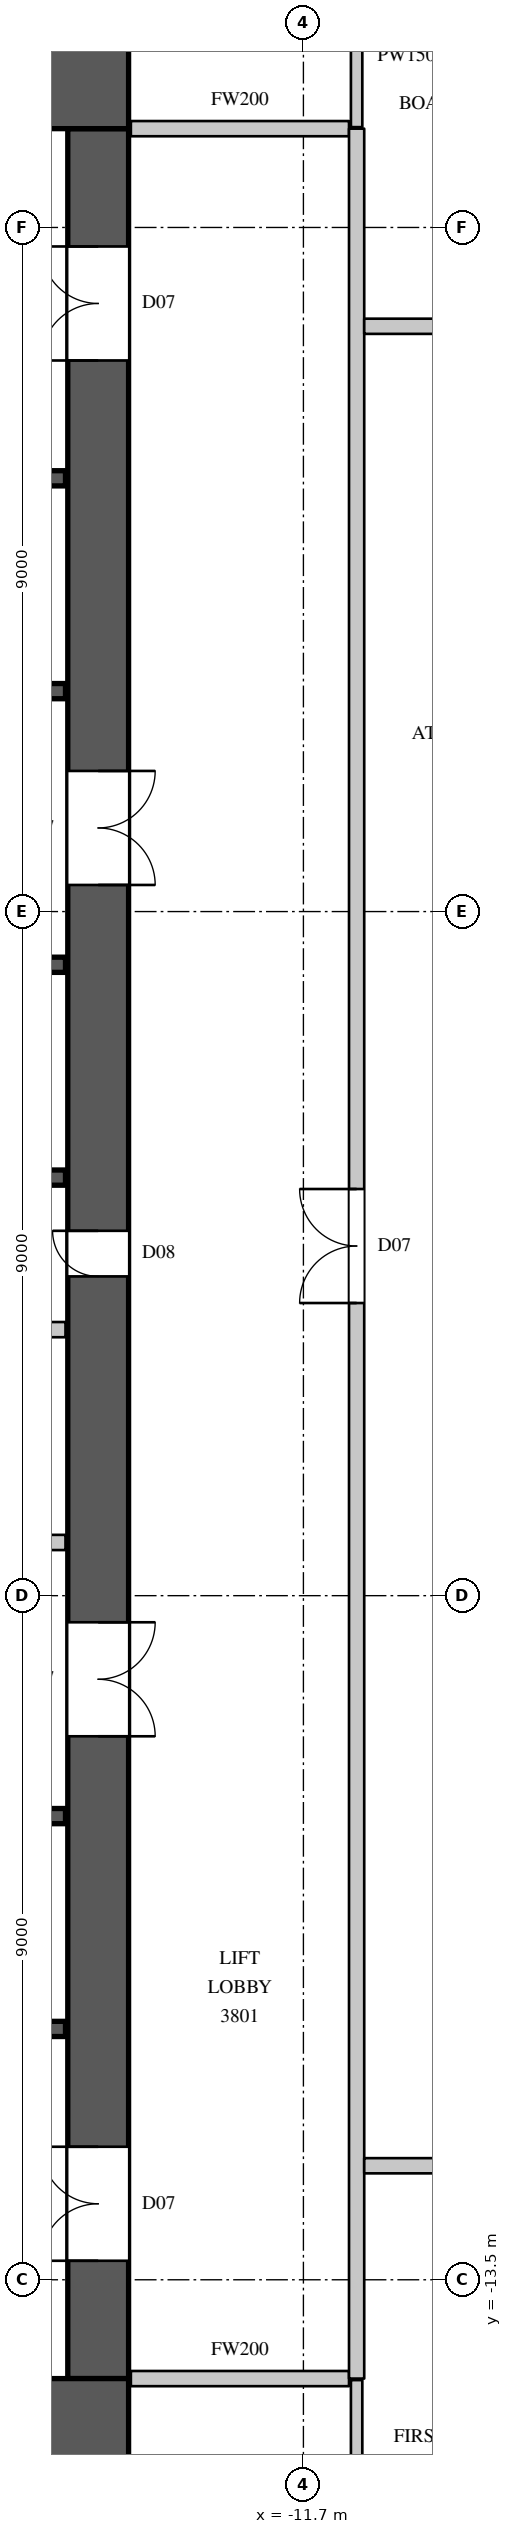
"""IFC4 building model, lengths in metres.
Left out: names, types, materials, properties, quantities, classifications, styles, units other than length and angle.
Written with IfcOpenShell. Run it as: python <this file> out.ifc"""

import sys

from ifc_helpers import new_model, si_unit, direction, frame, frame_2d, origin, place, context, subcontext, project, spatial, rectangle, extrude, element, fill, save


model = new_model("IFC4")
c1 = context("Model", 3, precision=1e-05, world=origin(), true_north=direction((0.0, 1.0)))
c2 = subcontext(c1, "Body", "Model", "MODEL_VIEW")
j1 = project(units=[si_unit("LENGTHUNIT", "METRE"), si_unit("PLANEANGLEUNIT", "RADIAN")], contexts=[c1])
p1 = place(None, origin())
s1 = spatial("IfcSite", under=j1, at=p1, CompositionType="ELEMENT")
p2 = place(p1, origin())
s2 = spatial("IfcBuilding", under=s1, at=p2, CompositionType="ELEMENT")
p3 = place(p2, frame((0.0, 0.0, 176.9)))
s3 = spatial("IfcBuildingStorey", under=s2, at=p3, CompositionType="ELEMENT", Elevation=176.9)
for number, where, z_axis, x_axis in (
    (1, (-30.0, 15.4, 0.0), (0.0, 0.0, 1.0), (1.0, 0.0, 0.0)),
    (2, (-30.0, -15.4, 0.0), (0.0, 0.0, 1.0), (1.0, 0.0, 0.0)),
):
    element("IfcWall", number, at=place(p3, frame(where, z_axis=z_axis, x_axis=x_axis)), inside=s3, PredefinedType="SHEAR", context=c2, shape_type="SweptSolid", body=[
        extrude(rectangle(XDim=16.0, YDim=1.2, at=frame_2d((8.0, 0.0))), origin(), (0.0, 0.0, 1.0), 4.1),
    ])
p4 = place(p3, frame((-14.4, -14.8, 0.0), z_axis=(0.0, 0.0, 1.0), x_axis=(0.0, 1.0, 0.0)))
e3 = element("IfcWall", 3, at=p4, inside=s3, PredefinedType="SHEAR", context=c2, shape_type="SweptSolid", body=[
    extrude(rectangle(XDim=29.6, YDim=0.8, at=frame_2d((14.8, 0.0))), origin(), (0.0, 0.0, 1.0), 4.1),
])
p5 = place(p4, frame((1.55, 0.0, 0.0)))
e4 = element("IfcOpeningElement", 4, at=p5, cuts=e3, PredefinedType="OPENING", context=c2, shape_type="SweptSolid", body=[
    extrude(rectangle(XDim=1.5, YDim=2.4, at=frame_2d((0.75, 1.2))), frame((0.0, 0.41, 0.0), z_axis=(0.0, -1.0, 0.0), x_axis=(1.0, 0.0, 0.0)), (0.0, 0.0, 1.0), 0.82),
])
p6 = place(p4, frame((26.55, 0.0, 0.0)))
e5 = element("IfcOpeningElement", 5, at=p6, cuts=e3, PredefinedType="OPENING", context=c2, shape_type="SweptSolid", body=[
    extrude(rectangle(XDim=1.5, YDim=2.4, at=frame_2d((0.75, 1.2))), frame((0.0, 0.41, 0.0), z_axis=(0.0, -1.0, 0.0), x_axis=(1.0, 0.0, 0.0)), (0.0, 0.0, 1.0), 0.82),
])
p7 = place(p4, frame((8.45, 0.0, 0.0)))
e6 = element("IfcOpeningElement", 6, at=p7, cuts=e3, PredefinedType="OPENING", context=c2, shape_type="SweptSolid", body=[
    extrude(rectangle(XDim=1.5, YDim=2.4, at=frame_2d((0.75, 1.2))), frame((0.0, 0.41, 0.0), z_axis=(0.0, -1.0, 0.0), x_axis=(1.0, 0.0, 0.0)), (0.0, 0.0, 1.0), 0.82),
])
p8 = place(p4, frame((19.65, 0.0, 0.0)))
e7 = element("IfcOpeningElement", 7, at=p8, cuts=e3, PredefinedType="OPENING", context=c2, shape_type="SweptSolid", body=[
    extrude(rectangle(XDim=1.5, YDim=2.4, at=frame_2d((0.75, 1.2))), frame((0.0, 0.41, 0.0), z_axis=(0.0, -1.0, 0.0), x_axis=(1.0, 0.0, 0.0)), (0.0, 0.0, 1.0), 0.82),
])
p9 = place(p4, frame((14.5, 0.0, 0.0)))
e8 = element("IfcOpeningElement", 8, at=p9, cuts=e3, PredefinedType="OPENING", context=c2, shape_type="SweptSolid", body=[
    extrude(rectangle(XDim=0.6, YDim=2.0, at=frame_2d((0.3, 1.0))), frame((0.0, 0.41, 0.0), z_axis=(0.0, -1.0, 0.0), x_axis=(1.0, 0.0, 0.0)), (0.0, 0.0, 1.0), 0.82),
])
p10 = place(p3, frame((-29.17, -3.8, 0.0), z_axis=(0.0, 0.0, 1.0), x_axis=(1.0, 0.0, 0.0)))
e9 = element("IfcWall", 9, at=p10, inside=s3, PredefinedType="PARTITIONING", context=c2, shape_type="SweptSolid", body=[
    extrude(rectangle(XDim=14.34, YDim=0.2, at=frame_2d((7.17, 0.0))), origin(), (0.0, 0.0, 1.0), 3.8),
])
p11 = place(p10, frame((6.7, 0.0, 0.0)))
e10 = element("IfcOpeningElement", 10, at=p11, cuts=e9, PredefinedType="OPENING", context=c2, shape_type="SweptSolid", body=[
    extrude(rectangle(XDim=0.9, YDim=2.2, at=frame_2d((0.45, 1.1))), frame((0.0, 0.11, 0.0), z_axis=(0.0, -1.0, 0.0), x_axis=(1.0, 0.0, 0.0)), (0.0, 0.0, 1.0), 0.22),
])
for number, where, z_axis, x_axis in (
    (11, (-13.97, -14.8, 0.0), (0.0, 0.0, 1.0), (1.0, 0.0, 0.0)),
    (12, (-13.97, 14.8, 0.0), (0.0, 0.0, 1.0), (1.0, 0.0, 0.0)),
):
    element("IfcWall", number, at=place(p3, frame(where, z_axis=z_axis, x_axis=x_axis)), inside=s3, PredefinedType="PARTITIONING", context=c2, shape_type="SweptSolid", body=[
        extrude(rectangle(XDim=2.87, YDim=0.2, at=frame_2d((1.435, 0.0))), origin(), (0.0, 0.0, 1.0), 3.8),
    ])
p12 = place(p3, frame((-11.0, -14.8, 0.0), z_axis=(0.0, 0.0, 1.0), x_axis=(0.0, 1.0, 0.0)))
e13 = element("IfcWall", 13, at=p12, inside=s3, PredefinedType="PARTITIONING", context=c2, shape_type="SweptSolid", body=[
    extrude(rectangle(XDim=29.6, YDim=0.2, at=frame_2d((14.8, 0.0))), origin(), (0.0, 0.0, 1.0), 3.8),
])
p13 = place(p12, frame((14.15, 0.0, 0.0)))
e14 = element("IfcOpeningElement", 14, at=p13, cuts=e13, PredefinedType="OPENING", context=c2, shape_type="SweptSolid", body=[
    extrude(rectangle(XDim=1.5, YDim=2.4, at=frame_2d((0.75, 1.2))), frame((0.0, 0.11, 0.0), z_axis=(0.0, -1.0, 0.0), x_axis=(1.0, 0.0, 0.0)), (0.0, 0.0, 1.0), 0.22),
])
p14 = place(p3, frame((-10.9, -12.0, 0.0), z_axis=(0.0, 0.0, 1.0), x_axis=(1.0, 0.0, 0.0)))
e15 = element("IfcWall", 15, at=p14, inside=s3, PredefinedType="PARTITIONING", context=c2, shape_type="SweptSolid", body=[
    extrude(rectangle(XDim=21.8, YDim=0.2, at=frame_2d((10.9, 0.0))), origin(), (0.0, 0.0, 1.0), 3.8),
])
p15 = place(p14, frame((0.95, 0.0, 0.0)))
e16 = element("IfcOpeningElement", 16, at=p15, cuts=e15, PredefinedType="OPENING", context=c2, shape_type="SweptSolid", body=[
    extrude(rectangle(XDim=0.9, YDim=2.2, at=frame_2d((0.45, 1.1))), frame((0.0, 0.11, 0.0), z_axis=(0.0, -1.0, 0.0), x_axis=(1.0, 0.0, 0.0)), (0.0, 0.0, 1.0), 0.22),
])
p16 = place(p14, frame((3.95, 0.0, 0.0)))
e17 = element("IfcOpeningElement", 17, at=p16, cuts=e15, PredefinedType="OPENING", context=c2, shape_type="SweptSolid", body=[
    extrude(rectangle(XDim=0.9, YDim=2.2, at=frame_2d((0.45, 1.1))), frame((0.0, 0.11, 0.0), z_axis=(0.0, -1.0, 0.0), x_axis=(1.0, 0.0, 0.0)), (0.0, 0.0, 1.0), 0.22),
])
p17 = place(p14, frame((6.7, 0.0, 0.0)))
e18 = element("IfcOpeningElement", 18, at=p17, cuts=e15, PredefinedType="OPENING", context=c2, shape_type="SweptSolid", body=[
    extrude(rectangle(XDim=0.9, YDim=2.2, at=frame_2d((0.45, 1.1))), frame((0.0, 0.11, 0.0), z_axis=(0.0, -1.0, 0.0), x_axis=(1.0, 0.0, 0.0)), (0.0, 0.0, 1.0), 0.22),
])
p18 = place(p14, frame((10.0, 0.0, 0.0)))
e19 = element("IfcOpeningElement", 19, at=p18, cuts=e15, PredefinedType="OPENING", context=c2, shape_type="SweptSolid", body=[
    extrude(rectangle(XDim=0.9, YDim=2.2, at=frame_2d((0.45, 1.1))), frame((0.0, 0.11, 0.0), z_axis=(0.0, -1.0, 0.0), x_axis=(1.0, 0.0, 0.0)), (0.0, 0.0, 1.0), 0.22),
])
p19 = place(p14, frame((13.55, 0.0, 0.0)))
e20 = element("IfcOpeningElement", 20, at=p19, cuts=e15, PredefinedType="OPENING", context=c2, shape_type="SweptSolid", body=[
    extrude(rectangle(XDim=0.9, YDim=2.2, at=frame_2d((0.45, 1.1))), frame((0.0, 0.11, 0.0), z_axis=(0.0, -1.0, 0.0), x_axis=(1.0, 0.0, 0.0)), (0.0, 0.0, 1.0), 0.22),
])
p20 = place(p14, frame((15.8, 0.0, 0.0)))
e21 = element("IfcOpeningElement", 21, at=p20, cuts=e15, PredefinedType="OPENING", context=c2, shape_type="SweptSolid", body=[
    extrude(rectangle(XDim=1.1, YDim=2.4, at=frame_2d((0.55, 1.2))), frame((0.0, 0.11, 0.0), z_axis=(0.0, -1.0, 0.0), x_axis=(1.0, 0.0, 0.0)), (0.0, 0.0, 1.0), 0.22),
])
p21 = place(p14, frame((18.0, 0.0, 0.0)))
e22 = element("IfcOpeningElement", 22, at=p21, cuts=e15, PredefinedType="OPENING", context=c2, shape_type="SweptSolid", body=[
    extrude(rectangle(XDim=1.1, YDim=2.4, at=frame_2d((0.55, 1.2))), frame((0.0, 0.11, 0.0), z_axis=(0.0, -1.0, 0.0), x_axis=(1.0, 0.0, 0.0)), (0.0, 0.0, 1.0), 0.22),
])
p22 = place(p3, frame((-10.9, 12.2, 0.0), z_axis=(0.0, 0.0, 1.0), x_axis=(1.0, 0.0, 0.0)))
e23 = element("IfcWall", 23, at=p22, inside=s3, PredefinedType="PARTITIONING", context=c2, shape_type="SweptSolid", body=[
    extrude(rectangle(XDim=3.704, YDim=0.2, at=frame_2d((1.852, 0.0))), origin(), (0.0, 0.0, 1.0), 3.8),
])
p23 = place(p22, frame((1.7, 0.0, 0.0)))
e24 = element("IfcOpeningElement", 24, at=p23, cuts=e23, PredefinedType="OPENING", context=c2, shape_type="SweptSolid", body=[
    extrude(rectangle(XDim=1.1, YDim=2.4, at=frame_2d((0.55, 1.2))), frame((0.0, 0.11, 0.0), z_axis=(0.0, -1.0, 0.0), x_axis=(1.0, 0.0, 0.0)), (0.0, 0.0, 1.0), 0.22),
])
for number, where, z_axis, x_axis in (
    (25, (-11.0, -16.7, 0.0), (0.0, 0.0, 1.0), (0.0, 1.0, 0.0)),
    (26, (-11.0, 14.82, 0.0), (0.0, 0.0, 1.0), (0.0, 1.0, 0.0)),
):
    element("IfcWall", number, at=place(p3, frame(where, z_axis=z_axis, x_axis=x_axis)), inside=s3, PredefinedType="PARTITIONING", context=c2, shape_type="SweptSolid", body=[
        extrude(rectangle(XDim=1.88, YDim=0.15, at=frame_2d((0.94, 0.0))), origin(), (0.0, 0.0, 1.0), 3.8),
    ])
p24 = place(p3, frame((-29.17, -1.0, 0.0), z_axis=(0.0, 0.0, 1.0), x_axis=(1.0, 0.0, 0.0)))
e27 = element("IfcWall", 27, at=p24, inside=s3, PredefinedType="PARTITIONING", context=c2, shape_type="SweptSolid", body=[
    extrude(rectangle(XDim=14.34, YDim=0.2, at=frame_2d((7.17, 0.0))), origin(), (0.0, 0.0, 1.0), 3.8),
])
p25 = place(p3, frame((-26.08, 1.0, 0.0), z_axis=(0.0, 0.0, 1.0), x_axis=(1.0, 0.0, 0.0)))
e28 = element("IfcWall", 28, at=p25, inside=s3, PredefinedType="SHEAR", context=c2, shape_type="SweptSolid", body=[
    extrude(rectangle(XDim=11.25, YDim=0.2, at=frame_2d((5.625, 0.0))), origin(), (0.0, 0.0, 1.0), 3.8),
])
p26 = place(p3, frame((-26.08, 3.8, 0.0), z_axis=(0.0, 0.0, 1.0), x_axis=(1.0, 0.0, 0.0)))
e29 = element("IfcWall", 29, at=p26, inside=s3, PredefinedType="SHEAR", context=c2, shape_type="SweptSolid", body=[
    extrude(rectangle(XDim=11.25, YDim=0.2, at=frame_2d((5.625, 0.0))), origin(), (0.0, 0.0, 1.0), 3.8),
])
p27 = place(p26, frame((0.8, 0.0, 0.0)))
e30 = element("IfcOpeningElement", 30, at=p27, cuts=e29, PredefinedType="OPENING", context=c2, shape_type="SweptSolid", body=[
    extrude(rectangle(XDim=1.1, YDim=2.2, at=frame_2d((0.55, 1.1))), frame((0.0, 0.11, 0.0), z_axis=(0.0, -1.0, 0.0), x_axis=(1.0, 0.0, 0.0)), (0.0, 0.0, 1.0), 0.22),
])
p28 = place(p26, frame((3.55, 0.0, 0.0)))
e31 = element("IfcOpeningElement", 31, at=p28, cuts=e29, PredefinedType="OPENING", context=c2, shape_type="SweptSolid", body=[
    extrude(rectangle(XDim=1.1, YDim=2.2, at=frame_2d((0.55, 1.1))), frame((0.0, 0.11, 0.0), z_axis=(0.0, -1.0, 0.0), x_axis=(1.0, 0.0, 0.0)), (0.0, 0.0, 1.0), 0.22),
])
p29 = place(p26, frame((6.25, 0.0, 0.0)))
e32 = element("IfcOpeningElement", 32, at=p29, cuts=e29, PredefinedType="OPENING", context=c2, shape_type="SweptSolid", body=[
    extrude(rectangle(XDim=1.1, YDim=2.2, at=frame_2d((0.55, 1.1))), frame((0.0, 0.11, 0.0), z_axis=(0.0, -1.0, 0.0), x_axis=(1.0, 0.0, 0.0)), (0.0, 0.0, 1.0), 0.22),
])
p30 = place(p26, frame((9.15, 0.0, 0.0)))
e33 = element("IfcOpeningElement", 33, at=p30, cuts=e29, PredefinedType="OPENING", context=c2, shape_type="SweptSolid", body=[
    extrude(rectangle(XDim=1.1, YDim=2.2, at=frame_2d((0.55, 1.1))), frame((0.0, 0.11, 0.0), z_axis=(0.0, -1.0, 0.0), x_axis=(1.0, 0.0, 0.0)), (0.0, 0.0, 1.0), 0.22),
])
p31 = place(p3, frame((-17.92, -10.2, 0.0), z_axis=(0.0, 0.0, 1.0), x_axis=(1.0, 0.0, 0.0)))
e34 = element("IfcWall", 34, at=p31, inside=s3, PredefinedType="SHEAR", context=c2, shape_type="SweptSolid", body=[
    extrude(rectangle(XDim=3.09, YDim=0.2, at=frame_2d((1.545, 0.0))), origin(), (0.0, 0.0, 1.0), 3.8),
])
p32 = place(p31, frame((1.0, 0.0, 0.0)))
e35 = element("IfcOpeningElement", 35, at=p32, cuts=e34, PredefinedType="OPENING", context=c2, shape_type="SweptSolid", body=[
    extrude(rectangle(XDim=1.1, YDim=2.2, at=frame_2d((0.55, 1.1))), frame((0.0, 0.11, 0.0), z_axis=(0.0, -1.0, 0.0), x_axis=(1.0, 0.0, 0.0)), (0.0, 0.0, 1.0), 0.22),
])
p33 = place(p3, frame((-17.9, -7.4, 0.0), z_axis=(0.0, 0.0, 1.0), x_axis=(1.0, 0.0, 0.0)))
e36 = element("IfcWall", 36, at=p33, inside=s3, PredefinedType="SHEAR", context=c2, shape_type="SweptSolid", body=[
    extrude(rectangle(XDim=3.07, YDim=0.2, at=frame_2d((1.535, 0.0))), origin(), (0.0, 0.0, 1.0), 3.8),
])
p34 = place(p3, frame((-17.92, 7.4, 0.0), z_axis=(0.0, 0.0, 1.0), x_axis=(1.0, 0.0, 0.0)))
e37 = element("IfcWall", 37, at=p34, inside=s3, PredefinedType="SHEAR", context=c2, shape_type="SweptSolid", body=[
    extrude(rectangle(XDim=3.09, YDim=0.2, at=frame_2d((1.545, 0.0))), origin(), (0.0, 0.0, 1.0), 3.8),
])
p35 = place(p3, frame((-17.92, 10.2, 0.0), z_axis=(0.0, 0.0, 1.0), x_axis=(1.0, 0.0, 0.0)))
e38 = element("IfcWall", 38, at=p35, inside=s3, PredefinedType="SHEAR", context=c2, shape_type="SweptSolid", body=[
    extrude(rectangle(XDim=3.09, YDim=0.2, at=frame_2d((1.545, 0.0))), origin(), (0.0, 0.0, 1.0), 3.8),
])
p36 = place(p35, frame((1.0, 0.0, 0.0)))
e39 = element("IfcOpeningElement", 39, at=p36, cuts=e38, PredefinedType="OPENING", context=c2, shape_type="SweptSolid", body=[
    extrude(rectangle(XDim=1.1, YDim=2.2, at=frame_2d((0.55, 1.1))), frame((0.0, 0.11, 0.0), z_axis=(0.0, -1.0, 0.0), x_axis=(1.0, 0.0, 0.0)), (0.0, 0.0, 1.0), 0.22),
])
p37 = place(p13, origin())
e40 = element("IfcDoor", 40, at=p37, inside=s3, OperationType="DOUBLE_DOOR_SINGLE_SWING", PredefinedType="DOOR", context=c2, shape_type="SweptSolid", body=[
    extrude(rectangle(XDim=1.5, YDim=2.4, at=frame_2d((0.75, 1.2))), frame((0.0, 0.025, 0.0), z_axis=(0.0, -1.0, 0.0), x_axis=(1.0, 0.0, 0.0)), (0.0, 0.0, 1.0), 0.05),
])
fill(e14, e40)
p38 = place(p5, origin())
e41 = element("IfcDoor", 41, at=p38, inside=s3, OperationType="DOUBLE_DOOR_SINGLE_SWING", PredefinedType="DOOR", context=c2, shape_type="SweptSolid", body=[
    extrude(rectangle(XDim=1.5, YDim=2.4, at=frame_2d((0.75, 1.2))), frame((0.0, 0.395, 0.0), z_axis=(0.0, -1.0, 0.0), x_axis=(1.0, 0.0, 0.0)), (0.0, 0.0, 1.0), 0.05),
])
fill(e4, e41)
p39 = place(p6, origin())
e42 = element("IfcDoor", 42, at=p39, inside=s3, OperationType="DOUBLE_DOOR_SINGLE_SWING", PredefinedType="DOOR", context=c2, shape_type="SweptSolid", body=[
    extrude(rectangle(XDim=1.5, YDim=2.4, at=frame_2d((0.75, 1.2))), frame((0.0, 0.395, 0.0), z_axis=(0.0, -1.0, 0.0), x_axis=(1.0, 0.0, 0.0)), (0.0, 0.0, 1.0), 0.05),
])
fill(e5, e42)
p40 = place(p7, origin())
e43 = element("IfcDoor", 43, at=p40, inside=s3, OperationType="DOUBLE_DOOR_SINGLE_SWING", PredefinedType="DOOR", context=c2, shape_type="SweptSolid", body=[
    extrude(rectangle(XDim=1.5, YDim=2.4, at=frame_2d((0.75, 1.2))), frame((0.0, -0.345, 0.0), z_axis=(0.0, -1.0, 0.0), x_axis=(1.0, 0.0, 0.0)), (0.0, 0.0, 1.0), 0.05),
])
fill(e6, e43)
p41 = place(p8, origin())
e44 = element("IfcDoor", 44, at=p41, inside=s3, OperationType="DOUBLE_DOOR_SINGLE_SWING", PredefinedType="DOOR", context=c2, shape_type="SweptSolid", body=[
    extrude(rectangle(XDim=1.5, YDim=2.4, at=frame_2d((0.75, 1.2))), frame((0.0, -0.345, 0.0), z_axis=(0.0, -1.0, 0.0), x_axis=(1.0, 0.0, 0.0)), (0.0, 0.0, 1.0), 0.05),
])
fill(e7, e44)
p42 = place(p9, origin())
e45 = element("IfcDoor", 45, at=p42, inside=s3, OperationType="SINGLE_SWING_RIGHT", PredefinedType="DOOR", context=c2, shape_type="SweptSolid", body=[
    extrude(rectangle(XDim=0.6, YDim=2.0, at=frame_2d((0.3, 1.0))), frame((0.0, 0.395, 0.0), z_axis=(0.0, -1.0, 0.0), x_axis=(1.0, 0.0, 0.0)), (0.0, 0.0, 1.0), 0.05),
])
fill(e8, e45)
save(model, sys.argv[1])
